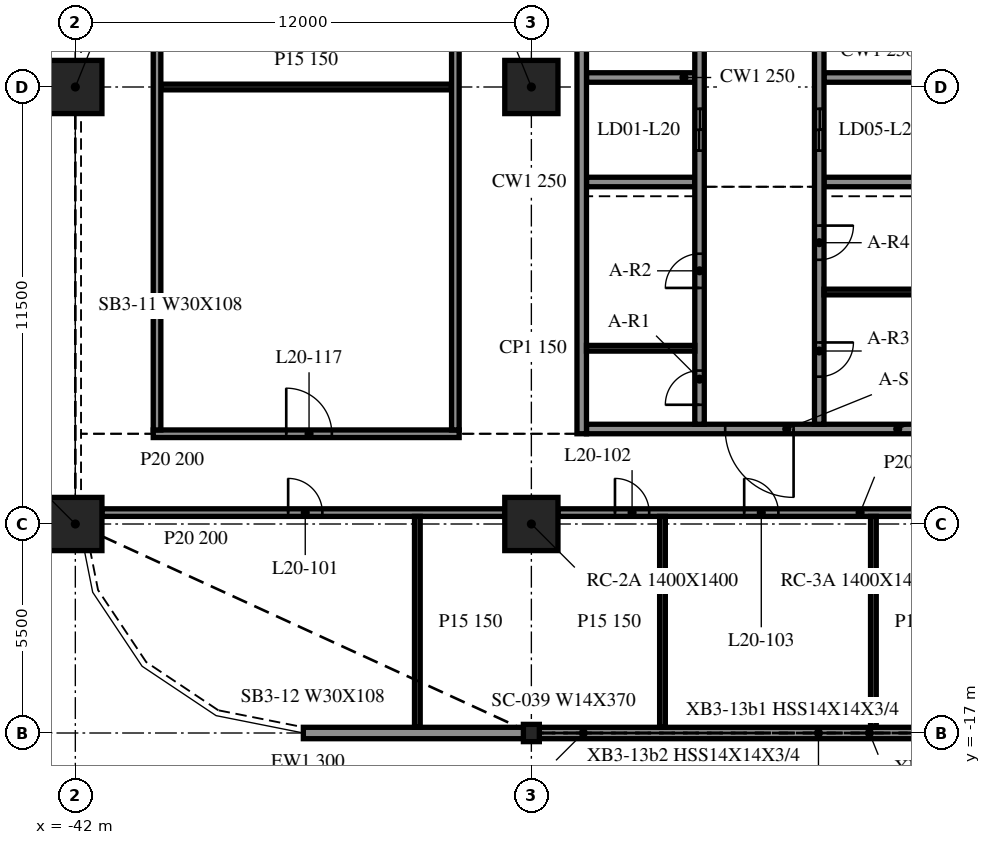
"""IFC4 building model, lengths in metres.
Left out: names, types, materials, properties, quantities, classifications, styles, units other than length and angle.
Written with IfcOpenShell. Run it as: python <this file> out.ifc"""

import sys

from ifc_helpers import new_model, si_unit, direction, frame, frame_2d, origin, origin_2d, place, context, subcontext, project, spatial, rectangle, i_section, extrude, element, fill, save


model = new_model("IFC4")
c1 = context("Model", 3, precision=1e-05, world=origin(), true_north=direction((0.0, 1.0)))
c2 = subcontext(c1, "Body", "Model", "MODEL_VIEW")
j1 = project(units=[si_unit("LENGTHUNIT", "METRE"), si_unit("PLANEANGLEUNIT", "RADIAN")], contexts=[c1])
p1 = place(None, origin())
s1 = spatial("IfcSite", under=j1, at=p1, CompositionType="ELEMENT")
p2 = place(p1, origin())
s2 = spatial("IfcBuilding", under=s1, at=p2, CompositionType="ELEMENT")
p3 = place(p2, frame((0.0, 0.0, 88.9)))
s3 = spatial("IfcBuildingStorey", under=s2, at=p3, CompositionType="ELEMENT", Elevation=88.9)
for number, where, z_axis, x_axis in (
    (1, (-42.0, -11.5, -0.34), (0.0, 0.0, 1.0), (1.0, 0.0, 0.0)),
    (2, (-42.0, 0.0, -0.34), (0.0, 0.0, 1.0), (1.0, 0.0, 0.0)),
    (3, (-30.0, -11.5, -0.34), (0.0, 0.0, 1.0), (1.0, 0.0, 0.0)),
    (4, (-30.0, 0.0, -0.34), (0.0, 0.0, 1.0), (1.0, 0.0, 0.0)),
):
    element("IfcColumn", number, at=place(p3, frame(where, z_axis=z_axis, x_axis=x_axis)), inside=s3, PredefinedType="COLUMN", context=c2, shape_type="SweptSolid", body=[
        extrude(rectangle(XDim=1.4, YDim=1.4, at=origin_2d()), origin(), (0.0, 0.0, 1.0), 4.1),
    ])
p4 = place(p3, frame((-30.0, -17.0, -0.34), z_axis=(0.0, 0.0, 1.0), x_axis=(1.0, 0.0, 0.0)))
e5 = element("IfcColumn", 5, at=p4, inside=s3, PredefinedType="COLUMN", context=c2, shape_type="SweptSolid", body=[
    extrude(i_section(OverallWidth=0.419, OverallDepth=0.455, WebThickness=0.042, FlangeThickness=0.068, at=origin_2d()), origin(), (0.0, 0.0, 1.0), 4.1),
])
p5 = place(p3, frame((-36.0, -17.0, 0.0), z_axis=(0.0, 0.0, 1.0), x_axis=(1.0, 0.0, 0.0)))
e6 = element("IfcWall", 6, at=p5, inside=s3, PredefinedType="NOTDEFINED", context=c2, shape_type="SweptSolid", body=[
    extrude(rectangle(XDim=5.979, YDim=0.3, at=frame_2d((2.99, 0.0))), origin(), (0.0, 0.0, 1.0), 3.003),
])
p6 = place(p3, frame((-29.979, -17.0, 0.0), z_axis=(0.0, 0.0, 1.0), x_axis=(1.0, 0.0, 0.0)))
e7 = element("IfcWall", 7, at=p6, inside=s3, PredefinedType="NOTDEFINED", context=c2, shape_type="SweptSolid", body=[
    extrude(rectangle(XDim=11.958, YDim=0.3, at=frame_2d((5.979, 0.0))), origin(), (0.0, 0.0, 1.0), 3.003),
])
p7 = place(p3, frame((-28.675, 15.125, 0.0), z_axis=(0.0, 0.0, 1.0), x_axis=(0.0, -1.0, 0.0)))
e8 = element("IfcWall", 8, at=p7, inside=s3, PredefinedType="SOLIDWALL", context=c2, shape_type="SweptSolid", body=[
    extrude(rectangle(XDim=24.25, YDim=0.25, at=frame_2d((12.125, 0.0))), origin(), (0.0, 0.0, 1.0), 3.76),
])
p8 = place(p3, frame((-19.45, -9.0, 0.0), z_axis=(0.0, 0.0, 1.0), x_axis=(-1.0, 0.0, 0.0)))
e9 = element("IfcWall", 9, at=p8, inside=s3, PredefinedType="SOLIDWALL", context=c2, shape_type="SweptSolid", body=[
    extrude(rectangle(XDim=9.1, YDim=0.25, at=frame_2d((4.55, 0.0))), origin(), (0.0, 0.0, 1.0), 3.76),
])
p9 = place(p8, frame((3.65, 0.0, 0.0)))
e10 = element("IfcOpeningElement", 10, at=p9, cuts=e9, PredefinedType="OPENING", context=c2, shape_type="SweptSolid", body=[
    extrude(rectangle(XDim=1.8, YDim=2.1, at=frame_2d((0.9, 1.05))), frame((0.0, 0.135, 0.0), z_axis=(0.0, -1.0, 0.0), x_axis=(1.0, 0.0, 0.0)), (0.0, 0.0, 1.0), 0.27),
])
p10 = place(p3, frame((-25.575, -8.875, 0.0), z_axis=(0.0, 0.0, 1.0), x_axis=(0.0, 1.0, 0.0)))
e11 = element("IfcWall", 11, at=p10, inside=s3, PredefinedType="SOLIDWALL", context=c2, shape_type="SweptSolid", body=[
    extrude(rectangle(XDim=17.5, YDim=0.25, at=frame_2d((8.75, 0.0))), origin(), (0.0, 0.0, 1.0), 3.76),
])
p11 = place(p10, frame((7.2, 0.0, 0.0)))
e12 = element("IfcOpeningElement", 12, at=p11, cuts=e11, PredefinedType="OPENING", context=c2, shape_type="SweptSolid", body=[
    extrude(rectangle(XDim=1.1, YDim=2.1, at=frame_2d((0.55, 1.05))), frame((0.0, 0.135, 0.0), z_axis=(0.0, -1.0, 0.0), x_axis=(1.0, 0.0, 0.0)), (0.0, 0.0, 1.0), 0.27),
])
p12 = place(p10, frame((9.95, 0.0, 0.0)))
e13 = element("IfcOpeningElement", 13, at=p12, cuts=e11, PredefinedType="OPENING", context=c2, shape_type="SweptSolid", body=[
    extrude(rectangle(XDim=1.1, YDim=2.1, at=frame_2d((0.55, 1.05))), frame((0.0, 0.135, 0.0), z_axis=(0.0, -1.0, 0.0), x_axis=(1.0, 0.0, 0.0)), (0.0, 0.0, 1.0), 0.27),
])
p13 = place(p10, frame((12.7, 0.0, 0.0)))
e14 = element("IfcOpeningElement", 14, at=p13, cuts=e11, PredefinedType="OPENING", context=c2, shape_type="SweptSolid", body=[
    extrude(rectangle(XDim=1.1, YDim=2.1, at=frame_2d((0.55, 1.05))), frame((0.0, 0.135, 0.0), z_axis=(0.0, -1.0, 0.0), x_axis=(1.0, 0.0, 0.0)), (0.0, 0.0, 1.0), 0.27),
])
p14 = place(p10, frame((15.45, 0.0, 0.0)))
e15 = element("IfcOpeningElement", 15, at=p14, cuts=e11, PredefinedType="OPENING", context=c2, shape_type="SweptSolid", body=[
    extrude(rectangle(XDim=1.1, YDim=2.1, at=frame_2d((0.55, 1.05))), frame((0.0, 0.135, 0.0), z_axis=(0.0, -1.0, 0.0), x_axis=(1.0, 0.0, 0.0)), (0.0, 0.0, 1.0), 0.27),
])
p15 = place(p10, frame((0.512, 0.0, 0.0)))
e16 = element("IfcOpeningElement", 16, at=p15, cuts=e11, PredefinedType="OPENING", context=c2, shape_type="SweptSolid", body=[
    extrude(rectangle(XDim=0.9, YDim=2.1, at=frame_2d((0.45, 1.05))), frame((0.0, 0.135, 0.0), z_axis=(0.0, -1.0, 0.0), x_axis=(1.0, 0.0, 0.0)), (0.0, 0.0, 1.0), 0.27),
])
p16 = place(p10, frame((3.587, 0.0, 0.0)))
e17 = element("IfcOpeningElement", 17, at=p16, cuts=e11, PredefinedType="OPENING", context=c2, shape_type="SweptSolid", body=[
    extrude(rectangle(XDim=0.9, YDim=2.1, at=frame_2d((0.45, 1.05))), frame((0.0, 0.135, 0.0), z_axis=(0.0, -1.0, 0.0), x_axis=(1.0, 0.0, 0.0)), (0.0, 0.0, 1.0), 0.27),
])
p17 = place(p3, frame((-22.425, 14.875, 0.0), z_axis=(0.0, 0.0, 1.0), x_axis=(0.0, -1.0, 0.0)))
e18 = element("IfcWall", 18, at=p17, inside=s3, PredefinedType="SOLIDWALL", context=c2, shape_type="SweptSolid", body=[
    extrude(rectangle(XDim=23.75, YDim=0.25, at=frame_2d((11.875, 0.0))), origin(), (0.0, 0.0, 1.0), 3.76),
])
p18 = place(p17, frame((15.45, 0.0, 0.0)))
e19 = element("IfcOpeningElement", 19, at=p18, cuts=e18, PredefinedType="OPENING", context=c2, shape_type="SweptSolid", body=[
    extrude(rectangle(XDim=1.1, YDim=2.1, at=frame_2d((0.55, 1.05))), frame((0.0, 0.135, 0.0), z_axis=(0.0, -1.0, 0.0), x_axis=(1.0, 0.0, 0.0)), (0.0, 0.0, 1.0), 0.27),
])
p19 = place(p17, frame((12.7, 0.0, 0.0)))
e20 = element("IfcOpeningElement", 20, at=p19, cuts=e18, PredefinedType="OPENING", context=c2, shape_type="SweptSolid", body=[
    extrude(rectangle(XDim=1.1, YDim=2.1, at=frame_2d((0.55, 1.05))), frame((0.0, 0.135, 0.0), z_axis=(0.0, -1.0, 0.0), x_axis=(1.0, 0.0, 0.0)), (0.0, 0.0, 1.0), 0.27),
])
p20 = place(p17, frame((21.597, 0.0, 0.0)))
e21 = element("IfcOpeningElement", 21, at=p20, cuts=e18, PredefinedType="OPENING", context=c2, shape_type="SweptSolid", body=[
    extrude(rectangle(XDim=0.9, YDim=2.1, at=frame_2d((0.45, 1.05))), frame((0.0, 0.135, 0.0), z_axis=(0.0, -1.0, 0.0), x_axis=(1.0, 0.0, 0.0)), (0.0, 0.0, 1.0), 0.27),
])
p21 = place(p17, frame((18.522, 0.0, 0.0)))
e22 = element("IfcOpeningElement", 22, at=p21, cuts=e18, PredefinedType="OPENING", context=c2, shape_type="SweptSolid", body=[
    extrude(rectangle(XDim=0.9, YDim=2.1, at=frame_2d((0.45, 1.05))), frame((0.0, 0.135, 0.0), z_axis=(0.0, -1.0, 0.0), x_axis=(1.0, 0.0, 0.0)), (0.0, 0.0, 1.0), 0.27),
])
p22 = place(p17, frame((4.087, 0.0, 0.0)))
e23 = element("IfcOpeningElement", 23, at=p22, cuts=e18, PredefinedType="OPENING", context=c2, shape_type="SweptSolid", body=[
    extrude(rectangle(XDim=0.9, YDim=2.1, at=frame_2d((0.45, 1.05))), frame((0.0, 0.135, 0.0), z_axis=(0.0, -1.0, 0.0), x_axis=(1.0, 0.0, 0.0)), (0.0, 0.0, 1.0), 0.27),
])
p23 = place(p17, frame((1.012, 0.0, 0.0)))
e24 = element("IfcOpeningElement", 24, at=p23, cuts=e18, PredefinedType="OPENING", context=c2, shape_type="SweptSolid", body=[
    extrude(rectangle(XDim=0.9, YDim=2.1, at=frame_2d((0.45, 1.05))), frame((0.0, 0.135, 0.0), z_axis=(0.0, -1.0, 0.0), x_axis=(1.0, 0.0, 0.0)), (0.0, 0.0, 1.0), 0.27),
])
for number, where, z_axis, x_axis in (
    (25, (-28.55, -2.5, 0.0), (0.0, 0.0, 1.0), (1.0, 0.0, 0.0)),
    (26, (-28.55, 0.25, 0.0), (0.0, 0.0, 1.0), (1.0, 0.0, 0.0)),
    (27, (-22.3, -2.5, 0.0), (0.0, 0.0, 1.0), (1.0, 0.0, 0.0)),
    (28, (-22.3, 0.25, 0.0), (0.0, 0.0, 1.0), (1.0, 0.0, 0.0)),
):
    element("IfcWall", number, at=place(p3, frame(where, z_axis=z_axis, x_axis=x_axis)), inside=s3, PredefinedType="SOLIDWALL", context=c2, shape_type="SweptSolid", body=[
        extrude(rectangle(XDim=2.85, YDim=0.25, at=frame_2d((1.425, 0.0))), origin(), (0.0, 0.0, 1.0), 3.76),
    ])
for number, where, z_axis, x_axis in (
    (29, (-28.55, -6.875, 0.0), (0.0, 0.0, 1.0), (1.0, 0.0, 0.0)),
    (30, (-22.3, -5.395, 0.0), (0.0, 0.0, 1.0), (1.0, 0.0, 0.0)),
):
    element("IfcWall", number, at=place(p3, frame(where, z_axis=z_axis, x_axis=x_axis)), inside=s3, PredefinedType="PARTITIONING", context=c2, shape_type="SweptSolid", body=[
        extrude(rectangle(XDim=2.85, YDim=0.15, at=frame_2d((1.425, 0.0))), origin(), (0.0, 0.0, 1.0), 3.76),
    ])
p24 = place(p3, frame((-41.3, -11.2, 0.0), z_axis=(0.0, 0.0, 1.0), x_axis=(1.0, 0.0, 0.0)))
e31 = element("IfcWall", 31, at=p24, inside=s3, PredefinedType="PARTITIONING", context=c2, shape_type="SweptSolid", body=[
    extrude(rectangle(XDim=10.6, YDim=0.2, at=frame_2d((5.3, 0.0))), origin(), (0.0, 0.0, 1.0), 3.76),
])
p25 = place(p24, frame((4.9, 0.0, 0.0)))
e32 = element("IfcOpeningElement", 32, at=p25, cuts=e31, PredefinedType="OPENING", context=c2, shape_type="SweptSolid", body=[
    extrude(rectangle(XDim=0.9, YDim=2.1, at=frame_2d((0.45, 1.05))), frame((0.0, 0.11, 0.0), z_axis=(0.0, -1.0, 0.0), x_axis=(1.0, 0.0, 0.0)), (0.0, 0.0, 1.0), 0.22),
])
p26 = place(p3, frame((-29.3, -11.2, 0.0), z_axis=(0.0, 0.0, 1.0), x_axis=(1.0, 0.0, 0.0)))
e33 = element("IfcWall", 33, at=p26, inside=s3, PredefinedType="PARTITIONING", context=c2, shape_type="SweptSolid", body=[
    extrude(rectangle(XDim=10.6, YDim=0.2, at=frame_2d((5.3, 0.0))), origin(), (0.0, 0.0, 1.0), 3.76),
])
p27 = place(p26, frame((1.5, 0.0, 0.0)))
e34 = element("IfcOpeningElement", 34, at=p27, cuts=e33, PredefinedType="OPENING", context=c2, shape_type="SweptSolid", body=[
    extrude(rectangle(XDim=0.9, YDim=2.1, at=frame_2d((0.45, 1.05))), frame((0.0, 0.11, 0.0), z_axis=(0.0, -1.0, 0.0), x_axis=(1.0, 0.0, 0.0)), (0.0, 0.0, 1.0), 0.22),
])
p28 = place(p26, frame((4.9, 0.0, 0.0)))
e35 = element("IfcOpeningElement", 35, at=p28, cuts=e33, PredefinedType="OPENING", context=c2, shape_type="SweptSolid", body=[
    extrude(rectangle(XDim=0.9, YDim=2.1, at=frame_2d((0.45, 1.05))), frame((0.0, 0.11, 0.0), z_axis=(0.0, -1.0, 0.0), x_axis=(1.0, 0.0, 0.0)), (0.0, 0.0, 1.0), 0.22),
])
p29 = place(p3, frame((-39.95, -9.125, 0.0), z_axis=(0.0, 0.0, 1.0), x_axis=(1.0, 0.0, 0.0)))
e36 = element("IfcWall", 36, at=p29, inside=s3, PredefinedType="PARTITIONING", context=c2, shape_type="SweptSolid", body=[
    extrude(rectangle(XDim=8.05, YDim=0.2, at=frame_2d((4.025, 0.0))), origin(), (0.0, 0.0, 1.0), 3.76),
])
p30 = place(p29, frame((3.5, 0.0, 0.0)))
e37 = element("IfcOpeningElement", 37, at=p30, cuts=e36, PredefinedType="OPENING", context=c2, shape_type="SweptSolid", body=[
    extrude(rectangle(XDim=1.2, YDim=2.1, at=frame_2d((0.6, 1.05))), frame((0.0, 0.11, 0.0), z_axis=(0.0, -1.0, 0.0), x_axis=(1.0, 0.0, 0.0)), (0.0, 0.0, 1.0), 0.22),
])
p31 = place(p3, frame((-39.75, 0.0, 0.0), z_axis=(0.0, 0.0, 1.0), x_axis=(1.0, 0.0, 0.0)))
e38 = element("IfcWall", 38, at=p31, inside=s3, PredefinedType="PARTITIONING", context=c2, shape_type="SweptSolid", body=[
    extrude(rectangle(XDim=7.65, YDim=0.15, at=frame_2d((3.825, 0.0))), origin(), (0.0, 0.0, 1.0), 3.76),
])
p32 = place(p3, frame((-39.85, -9.025, 0.0), z_axis=(0.0, 0.0, 1.0), x_axis=(0.0, 1.0, 0.0)))
e39 = element("IfcWall", 39, at=p32, inside=s3, PredefinedType="PARTITIONING", context=c2, shape_type="SweptSolid", body=[
    extrude(rectangle(XDim=24.05, YDim=0.2, at=frame_2d((12.025, 0.0))), origin(), (0.0, 0.0, 1.0), 3.76),
])
p33 = place(p3, frame((-33.0, -16.85, 0.0), z_axis=(0.0, 0.0, 1.0), x_axis=(0.0, 1.0, 0.0)))
e40 = element("IfcWall", 40, at=p33, inside=s3, PredefinedType="PARTITIONING", context=c2, shape_type="SweptSolid", body=[
    extrude(rectangle(XDim=5.55, YDim=0.15, at=frame_2d((2.775, 0.0))), origin(), (0.0, 0.0, 1.0), 3.76),
])
p34 = place(p3, frame((-32.0, -9.025, 0.0), z_axis=(0.0, 0.0, 1.0), x_axis=(0.0, 1.0, 0.0)))
e41 = element("IfcWall", 41, at=p34, inside=s3, PredefinedType="PARTITIONING", context=c2, shape_type="SweptSolid", body=[
    extrude(rectangle(XDim=24.05, YDim=0.2, at=frame_2d((12.025, 0.0))), origin(), (0.0, 0.0, 1.0), 3.76),
])
for number, where, z_axis, x_axis in (
    (42, (-26.55, -16.85, 0.0), (0.0, 0.0, 1.0), (0.0, 1.0, 0.0)),
    (43, (-21.0, -16.85, 0.0), (0.0, 0.0, 1.0), (0.0, 1.0, 0.0)),
):
    element("IfcWall", number, at=place(p3, frame(where, z_axis=z_axis, x_axis=x_axis)), inside=s3, PredefinedType="PARTITIONING", context=c2, shape_type="SweptSolid", body=[
        extrude(rectangle(XDim=5.55, YDim=0.15, at=frame_2d((2.775, 0.0))), origin(), (0.0, 0.0, 1.0), 3.76),
    ])
p35 = place(p9, origin())
e44 = element("IfcDoor", 44, at=p35, inside=s3, OperationType="DOUBLE_DOOR_SINGLE_SWING", PredefinedType="DOOR", context=c2, shape_type="SweptSolid", body=[
    extrude(rectangle(XDim=1.8, YDim=2.1, at=frame_2d((0.9, 1.05))), frame((0.0, 0.025, 0.0), z_axis=(0.0, -1.0, 0.0), x_axis=(1.0, 0.0, 0.0)), (0.0, 0.0, 1.0), 0.05),
])
fill(e10, e44)
p36 = place(p18, origin())
e45 = element("IfcDoor", 45, at=p36, inside=s3, OperationType="DOUBLE_DOOR_SLIDING", PredefinedType="DOOR", context=c2, shape_type="SweptSolid", body=[
    extrude(rectangle(XDim=1.1, YDim=2.1, at=frame_2d((0.55, 1.05))), frame((0.0, 0.025, 0.0), z_axis=(0.0, -1.0, 0.0), x_axis=(1.0, 0.0, 0.0)), (0.0, 0.0, 1.0), 0.05),
])
fill(e19, e45)
p37 = place(p11, origin())
e46 = element("IfcDoor", 46, at=p37, inside=s3, OperationType="DOUBLE_DOOR_SLIDING", PredefinedType="DOOR", context=c2, shape_type="SweptSolid", body=[
    extrude(rectangle(XDim=1.1, YDim=2.1, at=frame_2d((0.55, 1.05))), frame((0.0, 0.025, 0.0), z_axis=(0.0, -1.0, 0.0), x_axis=(1.0, 0.0, 0.0)), (0.0, 0.0, 1.0), 0.05),
])
fill(e12, e46)
p38 = place(p15, origin())
e47 = element("IfcDoor", 47, at=p38, inside=s3, OperationType="SINGLE_SWING_LEFT", PredefinedType="DOOR", context=c2, shape_type="SweptSolid", body=[
    extrude(rectangle(XDim=0.9, YDim=2.1, at=frame_2d((0.45, 1.05))), frame((0.0, 0.025, 0.0), z_axis=(0.0, -1.0, 0.0), x_axis=(1.0, 0.0, 0.0)), (0.0, 0.0, 1.0), 0.05),
])
fill(e16, e47)
p39 = place(p16, origin())
e48 = element("IfcDoor", 48, at=p39, inside=s3, OperationType="SINGLE_SWING_RIGHT", PredefinedType="DOOR", context=c2, shape_type="SweptSolid", body=[
    extrude(rectangle(XDim=0.9, YDim=2.1, at=frame_2d((0.45, 1.05))), frame((0.0, 0.025, 0.0), z_axis=(0.0, -1.0, 0.0), x_axis=(1.0, 0.0, 0.0)), (0.0, 0.0, 1.0), 0.05),
])
fill(e17, e48)
p40 = place(p20, origin())
e49 = element("IfcDoor", 49, at=p40, inside=s3, OperationType="SINGLE_SWING_LEFT", PredefinedType="DOOR", context=c2, shape_type="SweptSolid", body=[
    extrude(rectangle(XDim=0.9, YDim=2.1, at=frame_2d((0.45, 1.05))), frame((0.0, 0.025, 0.0), z_axis=(0.0, -1.0, 0.0), x_axis=(1.0, 0.0, 0.0)), (0.0, 0.0, 1.0), 0.05),
])
fill(e21, e49)
p41 = place(p21, origin())
e50 = element("IfcDoor", 50, at=p41, inside=s3, OperationType="SINGLE_SWING_RIGHT", PredefinedType="DOOR", context=c2, shape_type="SweptSolid", body=[
    extrude(rectangle(XDim=0.9, YDim=2.1, at=frame_2d((0.45, 1.05))), frame((0.0, 0.025, 0.0), z_axis=(0.0, -1.0, 0.0), x_axis=(1.0, 0.0, 0.0)), (0.0, 0.0, 1.0), 0.05),
])
fill(e22, e50)
p42 = place(p25, origin())
e51 = element("IfcDoor", 51, at=p42, inside=s3, OperationType="SINGLE_SWING_LEFT", PredefinedType="DOOR", context=c2, shape_type="SweptSolid", body=[
    extrude(rectangle(XDim=0.9, YDim=2.1, at=frame_2d((0.45, 1.05))), frame((0.0, 0.025, 0.0), z_axis=(0.0, -1.0, 0.0), x_axis=(1.0, 0.0, 0.0)), (0.0, 0.0, 1.0), 0.05),
])
fill(e32, e51)
p43 = place(p27, origin())
e52 = element("IfcDoor", 52, at=p43, inside=s3, OperationType="SINGLE_SWING_RIGHT", PredefinedType="DOOR", context=c2, shape_type="SweptSolid", body=[
    extrude(rectangle(XDim=0.9, YDim=2.1, at=frame_2d((0.45, 1.05))), frame((0.0, 0.025, 0.0), z_axis=(0.0, -1.0, 0.0), x_axis=(1.0, 0.0, 0.0)), (0.0, 0.0, 1.0), 0.05),
])
fill(e34, e52)
p44 = place(p28, origin())
e53 = element("IfcDoor", 53, at=p44, inside=s3, OperationType="SINGLE_SWING_LEFT", PredefinedType="DOOR", context=c2, shape_type="SweptSolid", body=[
    extrude(rectangle(XDim=0.9, YDim=2.1, at=frame_2d((0.45, 1.05))), frame((0.0, 0.025, 0.0), z_axis=(0.0, -1.0, 0.0), x_axis=(1.0, 0.0, 0.0)), (0.0, 0.0, 1.0), 0.05),
])
fill(e35, e53)
p45 = place(p30, origin())
e54 = element("IfcDoor", 54, at=p45, inside=s3, OperationType="SINGLE_SWING_RIGHT", PredefinedType="DOOR", context=c2, shape_type="SweptSolid", body=[
    extrude(rectangle(XDim=1.2, YDim=2.1, at=frame_2d((0.6, 1.05))), frame((0.0, 0.025, 0.0), z_axis=(0.0, -1.0, 0.0), x_axis=(1.0, 0.0, 0.0)), (0.0, 0.0, 1.0), 0.05),
])
fill(e37, e54)
save(model, sys.argv[1])
